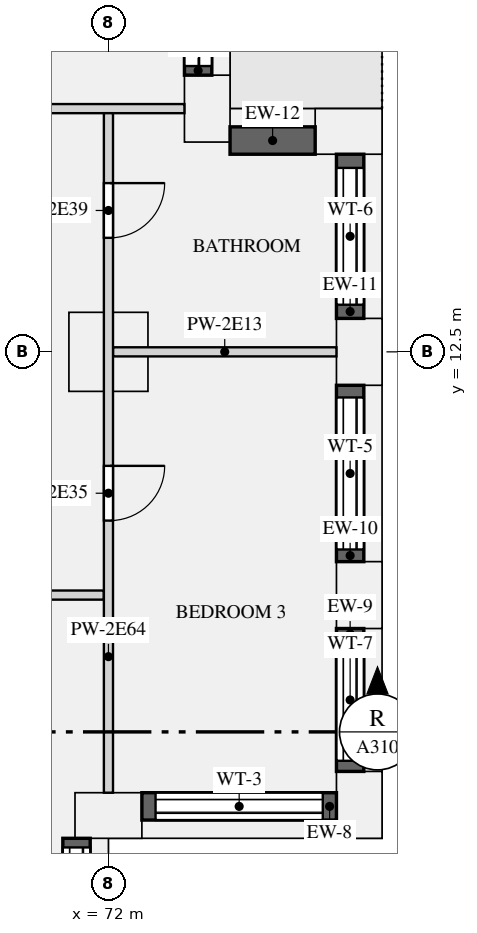
"""IFC4 building model, lengths in metres.
Left out: names, types, materials, properties, quantities, classifications, styles, units other than length and angle.
Written with IfcOpenShell. Run it as: python <this file> out.ifc"""

import sys

from ifc_helpers import new_model, si_unit, direction, frame, frame_2d, origin, origin_2d, place, context, subcontext, project, spatial, rectangle, extrude, element, fill, save


model = new_model("IFC4")
c1 = context("Model", 3, precision=1e-05, world=origin(), true_north=direction((0.0, 1.0)))
c2 = subcontext(c1, "Body", "Model", "MODEL_VIEW")
j1 = project(units=[si_unit("LENGTHUNIT", "METRE"), si_unit("PLANEANGLEUNIT", "RADIAN")], contexts=[c1])
p1 = place(None, origin())
s1 = spatial("IfcSite", under=j1, at=p1, CompositionType="ELEMENT")
p2 = place(p1, origin())
s2 = spatial("IfcBuilding", under=s1, at=p2, CompositionType="ELEMENT")
p3 = place(p2, frame((0.0, 0.0, 118.2)))
s3 = spatial("IfcBuildingStorey", under=s2, at=p3, CompositionType="ELEMENT", Elevation=118.2)
for number, where, z_axis, x_axis in (
    (1, (72.0, 4.875, 0.0), (0.0, 0.0, 1.0), (1.0, 0.0, 0.0)),
    (2, (76.125, 5.05, 0.0), (0.0, 0.0, 1.0), (0.0, 1.0, 0.0)),
    (3, (76.125, 8.5, 0.0), (0.0, 0.0, 1.0), (0.0, 1.0, 0.0)),
    (4, (76.125, 12.5, 0.0), (0.0, 0.0, 1.0), (0.0, 1.0, 0.0)),
    (5, (75.95, 16.125, 0.0), (0.0, 0.0, 1.0), (-1.0, 0.0, 0.0)),
    (6, (73.625, 16.5, 0.0), (0.0, 0.0, 1.0), (0.0, 1.0, 0.0)),
):
    element("IfcColumn", number, at=place(p3, frame(where, z_axis=z_axis, x_axis=x_axis)), inside=s3, PredefinedType="USERDEFINED", context=c2, shape_type="SweptSolid", body=[
        extrude(rectangle(XDim=1.1, YDim=0.75, at=origin_2d()), origin(), (0.0, 0.0, 1.0), 3.15),
    ])
p4 = place(p3, frame((72.0, 12.5, 0.0), z_axis=(0.0, 0.0, 1.0), x_axis=(1.0, 0.0, 0.0)))
e7 = element("IfcColumn", 7, at=p4, inside=s3, PredefinedType="COLUMN", context=c2, shape_type="SweptSolid", body=[
    extrude(rectangle(XDim=1.3, YDim=1.3, at=origin_2d()), origin(), (0.0, 0.0, 1.0), 3.15),
])
p5 = place(p3, frame((71.475, 1.1, 0.9), z_axis=(0.0, 0.0, 1.0), x_axis=(0.0, 1.0, 0.0)))
e8 = element("IfcWall", 8, at=p5, inside=s3, PredefinedType="SOLIDWALL", context=c2, shape_type="SweptSolid", body=[
    extrude(rectangle(XDim=3.4, YDim=0.45, at=frame_2d((1.7, 0.0))), origin(), (0.0, 0.0, 1.0), 1.93),
])
p6 = place(p5, frame((0.15, 0.0, 0.15)))
e9 = element("IfcOpeningElement", 9, at=p6, cuts=e8, PredefinedType="OPENING", context=c2, shape_type="SweptSolid", body=[
    extrude(rectangle(XDim=3.1, YDim=1.5, at=frame_2d((1.55, 0.75))), frame((0.0, 0.235, 0.0), z_axis=(0.0, -1.0, 0.0), x_axis=(1.0, 0.0, 0.0)), (0.0, 0.0, 1.0), 0.47),
])
p7 = place(p3, frame((72.55, 5.025, 0.9), z_axis=(0.0, 0.0, 1.0), x_axis=(1.0, 0.0, 0.0)))
e10 = element("IfcWall", 10, at=p7, inside=s3, PredefinedType="SOLIDWALL", context=c2, shape_type="SweptSolid", body=[
    extrude(rectangle(XDim=3.2, YDim=0.45, at=frame_2d((1.6, 0.0))), origin(), (0.0, 0.0, 1.0), 1.93),
])
p8 = place(p7, frame((0.225, 0.0, 0.15)))
e11 = element("IfcOpeningElement", 11, at=p8, cuts=e10, PredefinedType="OPENING", context=c2, shape_type="SweptSolid", body=[
    extrude(rectangle(XDim=2.75, YDim=1.5, at=frame_2d((1.375, 0.75))), frame((0.0, 0.235, 0.0), z_axis=(0.0, -1.0, 0.0), x_axis=(1.0, 0.0, 0.0)), (0.0, 0.0, 1.0), 0.47),
])
p9 = place(p3, frame((75.975, 5.6, 0.9), z_axis=(0.0, 0.0, 1.0), x_axis=(0.0, 1.0, 0.0)))
e12 = element("IfcWall", 12, at=p9, inside=s3, PredefinedType="SOLIDWALL", context=c2, shape_type="SweptSolid", body=[
    extrude(rectangle(XDim=2.35, YDim=0.45, at=frame_2d((1.175, 0.0))), origin(), (0.0, 0.0, 1.0), 1.93),
])
p10 = place(p9, frame((0.175, 0.0, 0.15)))
e13 = element("IfcOpeningElement", 13, at=p10, cuts=e12, PredefinedType="OPENING", context=c2, shape_type="SweptSolid", body=[
    extrude(rectangle(XDim=2.0, YDim=1.5, at=frame_2d((1.0, 0.75))), frame((0.0, 0.235, 0.0), z_axis=(0.0, -1.0, 0.0), x_axis=(1.0, 0.0, 0.0)), (0.0, 0.0, 1.0), 0.47),
])
p11 = place(p3, frame((75.975, 9.05, 0.9), z_axis=(0.0, 0.0, 1.0), x_axis=(0.0, 1.0, 0.0)))
e14 = element("IfcWall", 14, at=p11, inside=s3, PredefinedType="SOLIDWALL", context=c2, shape_type="SweptSolid", body=[
    extrude(rectangle(XDim=2.9, YDim=0.45, at=frame_2d((1.45, 0.0))), origin(), (0.0, 0.0, 1.0), 1.93),
])
p12 = place(p11, frame((0.2, 0.0, 0.15)))
e15 = element("IfcOpeningElement", 15, at=p12, cuts=e14, PredefinedType="OPENING", context=c2, shape_type="SweptSolid", body=[
    extrude(rectangle(XDim=2.5, YDim=1.5, at=frame_2d((1.25, 0.75))), frame((0.0, 0.235, 0.0), z_axis=(0.0, -1.0, 0.0), x_axis=(1.0, 0.0, 0.0)), (0.0, 0.0, 1.0), 0.47),
])
p13 = place(p3, frame((75.975, 13.05, 0.9), z_axis=(0.0, 0.0, 1.0), x_axis=(0.0, 1.0, 0.0)))
e16 = element("IfcWall", 16, at=p13, inside=s3, PredefinedType="SOLIDWALL", context=c2, shape_type="SweptSolid", body=[
    extrude(rectangle(XDim=2.7, YDim=0.45, at=frame_2d((1.35, 0.0))), origin(), (0.0, 0.0, 1.0), 1.93),
])
p14 = place(p13, frame((0.225, 0.0, 0.15)))
e17 = element("IfcOpeningElement", 17, at=p14, cuts=e16, PredefinedType="OPENING", context=c2, shape_type="SweptSolid", body=[
    extrude(rectangle(XDim=2.25, YDim=1.5, at=frame_2d((1.125, 0.75))), frame((0.0, 0.235, 0.0), z_axis=(0.0, -1.0, 0.0), x_axis=(1.0, 0.0, 0.0)), (0.0, 0.0, 1.0), 0.47),
])
p15 = place(p3, frame((75.4, 15.975, 0.9), z_axis=(0.0, 0.0, 1.0), x_axis=(-1.0, 0.0, 0.0)))
e18 = element("IfcWall", 18, at=p15, inside=s3, PredefinedType="SOLIDWALL", context=c2, shape_type="SweptSolid", body=[
    extrude(rectangle(XDim=1.4, YDim=0.45, at=frame_2d((0.7, 0.0))), origin(), (0.0, 0.0, 1.0), 1.93),
])
p16 = place(p3, frame((73.475, 17.05, 0.0), z_axis=(0.0, 0.0, 1.0), x_axis=(0.0, 1.0, 0.0)))
e19 = element("IfcWall", 19, at=p16, inside=s3, PredefinedType="SOLIDWALL", context=c2, shape_type="SweptSolid", body=[
    extrude(rectangle(XDim=2.9, YDim=0.45, at=frame_2d((1.45, 0.0))), origin(), (0.0, 0.0, 1.0), 2.83),
])
p17 = place(p16, frame((0.15, 0.0, 0.0)))
e20 = element("IfcOpeningElement", 20, at=p17, cuts=e19, PredefinedType="OPENING", context=c2, shape_type="SweptSolid", body=[
    extrude(rectangle(XDim=2.6, YDim=2.3, at=frame_2d((1.3, 1.15))), frame((0.0, 0.235, 0.0), z_axis=(0.0, -1.0, 0.0), x_axis=(1.0, 0.0, 0.0)), (0.0, 0.0, 1.0), 0.47),
])
p18 = place(p3, frame((72.075, 12.5, 0.0), z_axis=(0.0, 0.0, 1.0), x_axis=(1.0, 0.0, 0.0)))
e21 = element("IfcWall", 21, at=p18, inside=s3, PredefinedType="PARTITIONING", context=c2, shape_type="SweptSolid", body=[
    extrude(rectangle(XDim=3.675, YDim=0.15, at=frame_2d((1.837, 0.0))), origin(), (0.0, 0.0, 1.0), 2.83),
])
p19 = place(p3, frame((63.075, 16.5, 0.0), z_axis=(0.0, 0.0, 1.0), x_axis=(1.0, 0.0, 0.0)))
e22 = element("IfcWall", 22, at=p19, inside=s3, PredefinedType="PARTITIONING", context=c2, shape_type="SweptSolid", body=[
    extrude(rectangle(XDim=10.175, YDim=0.15, at=frame_2d((5.087, 0.0))), origin(), (0.0, 0.0, 1.0), 2.83),
])
p20 = place(p19, frame((5.925, 0.0, 0.0)))
e23 = element("IfcOpeningElement", 23, at=p20, cuts=e22, PredefinedType="OPENING", context=c2, shape_type="SweptSolid", body=[
    extrude(rectangle(XDim=1.5, YDim=2.1, at=frame_2d((0.75, 1.05))), frame((0.0, 0.085, 0.0), z_axis=(0.0, -1.0, 0.0), x_axis=(1.0, 0.0, 0.0)), (0.0, 0.0, 1.0), 0.17),
])
p21 = place(p3, frame((54.0, 8.5, 0.0), z_axis=(0.0, 0.0, 1.0), x_axis=(1.0, 0.0, 0.0)))
e24 = element("IfcWall", 24, at=p21, inside=s3, PredefinedType="PARTITIONING", context=c2, shape_type="SweptSolid", body=[
    extrude(rectangle(XDim=17.925, YDim=0.15, at=frame_2d((8.962, 0.0))), origin(), (0.0, 0.0, 1.0), 2.83),
])
p22 = place(p21, frame((1.8, 0.0, 0.0)))
e25 = element("IfcOpeningElement", 25, at=p22, cuts=e24, PredefinedType="OPENING", context=c2, shape_type="SweptSolid", body=[
    extrude(rectangle(XDim=0.9, YDim=2.1, at=frame_2d((0.45, 1.05))), frame((0.0, 0.085, 0.0), z_axis=(0.0, -1.0, 0.0), x_axis=(1.0, 0.0, 0.0)), (0.0, 0.0, 1.0), 0.17),
])
p23 = place(p21, frame((8.25, 0.0, 0.0)))
e26 = element("IfcOpeningElement", 26, at=p23, cuts=e24, PredefinedType="OPENING", context=c2, shape_type="SweptSolid", body=[
    extrude(rectangle(XDim=1.5, YDim=2.1, at=frame_2d((0.75, 1.05))), frame((0.0, 0.085, 0.0), z_axis=(0.0, -1.0, 0.0), x_axis=(1.0, 0.0, 0.0)), (0.0, 0.0, 1.0), 0.17),
])
p24 = place(p21, frame((15.3, 0.0, 0.0)))
e27 = element("IfcOpeningElement", 27, at=p24, cuts=e24, PredefinedType="OPENING", context=c2, shape_type="SweptSolid", body=[
    extrude(rectangle(XDim=0.9, YDim=2.1, at=frame_2d((0.45, 1.05))), frame((0.0, 0.085, 0.0), z_axis=(0.0, -1.0, 0.0), x_axis=(1.0, 0.0, 0.0)), (0.0, 0.0, 1.0), 0.17),
])
p25 = place(p3, frame((72.0, 5.25, 0.0), z_axis=(0.0, 0.0, 1.0), x_axis=(0.0, 1.0, 0.0)))
e28 = element("IfcWall", 28, at=p25, inside=s3, PredefinedType="PARTITIONING", context=c2, shape_type="SweptSolid", body=[
    extrude(rectangle(XDim=11.175, YDim=0.15, at=frame_2d((5.587, 0.0))), origin(), (0.0, 0.0, 1.0), 2.83),
])
p26 = place(p25, frame((4.475, 0.0, 0.0)))
e29 = element("IfcOpeningElement", 29, at=p26, cuts=e28, PredefinedType="OPENING", context=c2, shape_type="SweptSolid", body=[
    extrude(rectangle(XDim=0.9, YDim=2.1, at=frame_2d((0.45, 1.05))), frame((0.0, 0.085, 0.0), z_axis=(0.0, -1.0, 0.0), x_axis=(1.0, 0.0, 0.0)), (0.0, 0.0, 1.0), 0.17),
])
p27 = place(p25, frame((9.125, 0.0, 0.0)))
e30 = element("IfcOpeningElement", 30, at=p27, cuts=e28, PredefinedType="OPENING", context=c2, shape_type="SweptSolid", body=[
    extrude(rectangle(XDim=0.9, YDim=2.1, at=frame_2d((0.45, 1.05))), frame((0.0, 0.085, 0.0), z_axis=(0.0, -1.0, 0.0), x_axis=(1.0, 0.0, 0.0)), (0.0, 0.0, 1.0), 0.17),
])
p28 = place(p6, origin())
e31 = element("IfcWindow", 31, at=p28, inside=s3, PartitioningType="SINGLE_PANEL", PredefinedType="WINDOW", context=c2, shape_type="SweptSolid", body=[
    extrude(rectangle(XDim=3.1, YDim=1.5, at=frame_2d((1.55, 0.75))), frame((0.0, -0.065, 0.0), z_axis=(0.0, -1.0, 0.0), x_axis=(1.0, 0.0, 0.0)), (0.0, 0.0, 1.0), 0.06),
])
fill(e9, e31)
p29 = place(p8, origin())
e32 = element("IfcWindow", 32, at=p29, inside=s3, PartitioningType="SINGLE_PANEL", PredefinedType="WINDOW", context=c2, shape_type="SweptSolid", body=[
    extrude(rectangle(XDim=2.75, YDim=1.5, at=frame_2d((1.375, 0.75))), frame((0.0, -0.065, 0.0), z_axis=(0.0, -1.0, 0.0), x_axis=(1.0, 0.0, 0.0)), (0.0, 0.0, 1.0), 0.06),
])
fill(e11, e32)
p30 = place(p10, origin())
e33 = element("IfcWindow", 33, at=p30, inside=s3, PartitioningType="SINGLE_PANEL", PredefinedType="WINDOW", context=c2, shape_type="SweptSolid", body=[
    extrude(rectangle(XDim=2.0, YDim=1.5, at=frame_2d((1.0, 0.75))), frame((0.0, -0.065, 0.0), z_axis=(0.0, -1.0, 0.0), x_axis=(1.0, 0.0, 0.0)), (0.0, 0.0, 1.0), 0.06),
])
fill(e13, e33)
p31 = place(p12, origin())
e34 = element("IfcWindow", 34, at=p31, inside=s3, PartitioningType="SINGLE_PANEL", PredefinedType="WINDOW", context=c2, shape_type="SweptSolid", body=[
    extrude(rectangle(XDim=2.5, YDim=1.5, at=frame_2d((1.25, 0.75))), frame((0.0, -0.065, 0.0), z_axis=(0.0, -1.0, 0.0), x_axis=(1.0, 0.0, 0.0)), (0.0, 0.0, 1.0), 0.06),
])
fill(e15, e34)
p32 = place(p14, origin())
e35 = element("IfcWindow", 35, at=p32, inside=s3, PartitioningType="SINGLE_PANEL", PredefinedType="WINDOW", context=c2, shape_type="SweptSolid", body=[
    extrude(rectangle(XDim=2.25, YDim=1.5, at=frame_2d((1.125, 0.75))), frame((0.0, -0.065, 0.0), z_axis=(0.0, -1.0, 0.0), x_axis=(1.0, 0.0, 0.0)), (0.0, 0.0, 1.0), 0.06),
])
fill(e17, e35)
p33 = place(p17, origin())
e36 = element("IfcDoor", 36, at=p33, inside=s3, OperationType="SLIDING_TO_LEFT", PredefinedType="DOOR", context=c2, shape_type="SweptSolid", body=[
    extrude(rectangle(XDim=2.6, YDim=2.3, at=frame_2d((1.3, 1.15))), frame((0.0, -0.07, 0.0), z_axis=(0.0, -1.0, 0.0), x_axis=(1.0, 0.0, 0.0)), (0.0, 0.0, 1.0), 0.05),
])
fill(e20, e36)
p34 = place(p26, frame((0.9, 0.0, 0.0), z_axis=(0.0, 0.0, 1.0), x_axis=(-1.0, 0.0, 0.0)))
e37 = element("IfcDoor", 37, at=p34, inside=s3, OperationType="SINGLE_SWING_LEFT", PredefinedType="DOOR", context=c2, shape_type="SweptSolid", body=[
    extrude(rectangle(XDim=0.9, YDim=2.1, at=frame_2d((0.45, 1.05))), frame((0.0, 0.025, 0.0), z_axis=(0.0, -1.0, 0.0), x_axis=(1.0, 0.0, 0.0)), (0.0, 0.0, 1.0), 0.05),
])
fill(e29, e37)
p35 = place(p27, frame((0.9, 0.0, 0.0), z_axis=(0.0, 0.0, 1.0), x_axis=(-1.0, 0.0, 0.0)))
e38 = element("IfcDoor", 38, at=p35, inside=s3, OperationType="SINGLE_SWING_LEFT", PredefinedType="DOOR", context=c2, shape_type="SweptSolid", body=[
    extrude(rectangle(XDim=0.9, YDim=2.1, at=frame_2d((0.45, 1.05))), frame((0.0, 0.025, 0.0), z_axis=(0.0, -1.0, 0.0), x_axis=(1.0, 0.0, 0.0)), (0.0, 0.0, 1.0), 0.05),
])
fill(e30, e38)
save(model, sys.argv[1])
